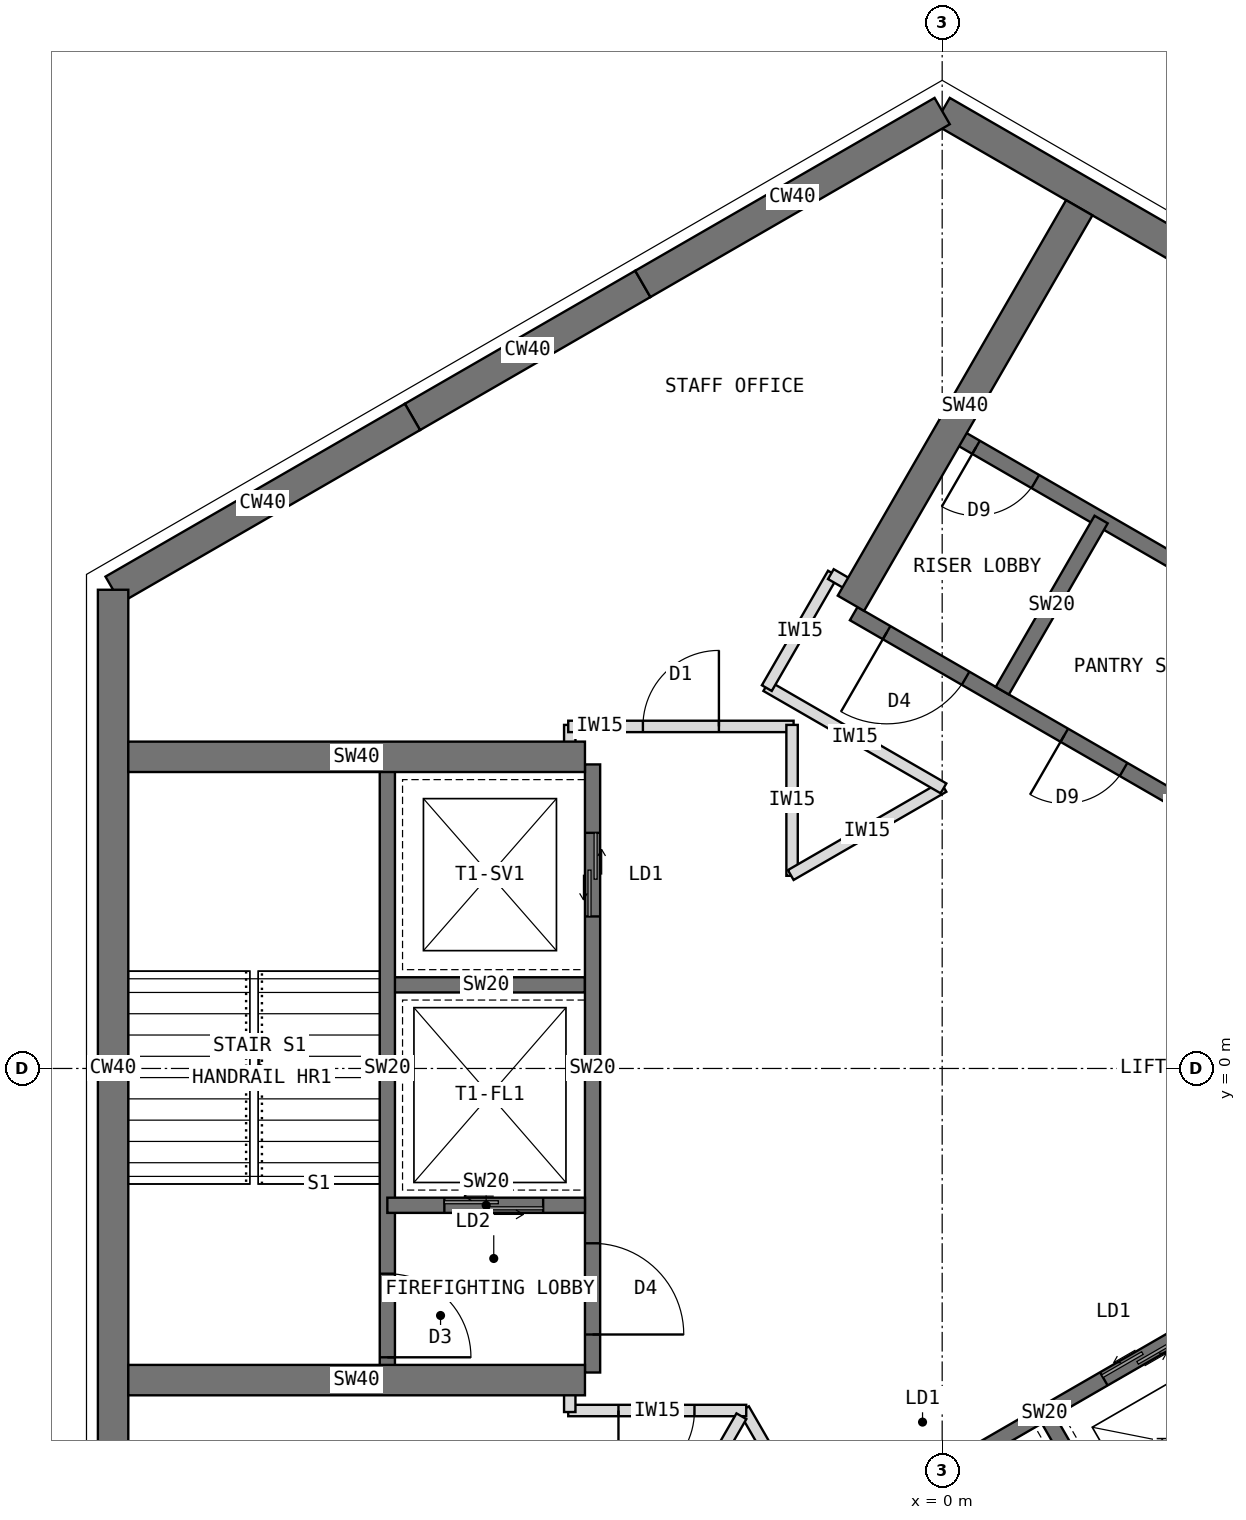
"""IFC4 building model, lengths in metres.
Left out: names, types, materials, properties, quantities, classifications, styles, units other than length and angle.
Written with IfcOpenShell. Run it as: python <this file> out.ifc"""

import sys

from ifc_helpers import new_model, si_unit, direction, frame, frame_2d, origin, place, context, subcontext, project, spatial, rectangle, extrude, element, fill, save


model = new_model("IFC4")
c1 = context("Model", 3, precision=1e-05, world=origin(), true_north=direction((0.0, 1.0)))
c2 = subcontext(c1, "Body", "Model", "MODEL_VIEW")
j1 = project(units=[si_unit("LENGTHUNIT", "METRE"), si_unit("PLANEANGLEUNIT", "RADIAN")], contexts=[c1])
p1 = place(None, origin())
s1 = spatial("IfcSite", under=j1, at=p1, CompositionType="ELEMENT")
p2 = place(p1, origin())
s2 = spatial("IfcBuilding", under=s1, at=p2, CompositionType="ELEMENT")
p3 = place(p2, frame((0.0, 0.0, 255.5)))
s3 = spatial("IfcBuildingStorey", under=s2, at=p3, CompositionType="ELEMENT", Elevation=255.5)
p4 = place(p3, frame((10.908, 6.298, 0.0), z_axis=(0.0, 0.0, 1.0), x_axis=(-0.866021940709, 0.500005998175, 0.0)))
e1 = element("IfcWall", 1, at=p4, inside=s3, PredefinedType="SHEAR", context=c2, shape_type="SweptSolid", body=[
    extrude(rectangle(XDim=12.596, YDim=0.4, at=frame_2d((6.298, 0.0))), origin(), (0.0, 0.0, 1.0), 4.0),
])
p5 = place(p3, frame((0.0, 12.596, 0.0), z_axis=(0.0, 0.0, 1.0), x_axis=(-0.866011268655, -0.500024481964, 0.0)))
e2 = element("IfcWall", 2, at=p5, inside=s3, PredefinedType="SHEAR", context=c2, shape_type="SweptSolid", body=[
    extrude(rectangle(XDim=4.548, YDim=0.4, at=frame_2d((2.274, 0.0))), origin(), (0.0, 0.0, 1.0), 4.0),
])
p6 = place(p3, frame((-3.939, 10.322, 0.0), z_axis=(0.0, 0.0, 1.0), x_axis=(-0.866019471182, -0.500010275428, 0.0)))
e3 = element("IfcWall", 3, at=p6, inside=s3, PredefinedType="SHEAR", context=c2, shape_type="SweptSolid", body=[
    extrude(rectangle(XDim=3.5, YDim=0.4, at=frame_2d((1.75, 0.0))), origin(), (0.0, 0.0, 1.0), 4.0),
])
p7 = place(p3, frame((-6.97, 8.572, 0.0), z_axis=(0.0, 0.0, 1.0), x_axis=(-0.866034513004, -0.499984222037, 0.0)))
e4 = element("IfcWall", 4, at=p7, inside=s3, PredefinedType="SHEAR", context=c2, shape_type="SweptSolid", body=[
    extrude(rectangle(XDim=4.548, YDim=0.4, at=frame_2d((2.274, 0.0))), origin(), (0.0, 0.0, 1.0), 4.0),
])
p8 = place(p3, frame((-10.908, 6.298, 0.0), z_axis=(0.0, 0.0, 1.0), x_axis=(0.0, -1.0, 0.0)))
e5 = element("IfcWall", 5, at=p8, inside=s3, PredefinedType="SHEAR", context=c2, shape_type="SweptSolid", body=[
    extrude(rectangle(XDim=12.596, YDim=0.4, at=frame_2d((6.298, 0.0))), origin(), (0.0, 0.0, 1.0), 4.0),
])
p9 = place(p3, frame((5.764, 1.984, 0.0), z_axis=(0.0, 0.0, 1.0), x_axis=(-0.866026010844, 0.49999894854, 0.0)))
e6 = element("IfcWall", 6, at=p9, inside=s3, PredefinedType="SHEAR", context=c2, shape_type="SweptSolid", body=[
    extrude(rectangle(XDim=8.0, YDim=0.2, at=frame_2d((4.0, 0.0))), origin(), (0.0, 0.0, 1.0), 4.0),
])
p10 = place(p9, frame((6.3, 0.0, 0.0)))
e7 = element("IfcOpeningElement", 7, at=p10, cuts=e6, PredefinedType="OPENING", context=c2, shape_type="SweptSolid", body=[
    extrude(rectangle(XDim=1.2, YDim=2.1, at=frame_2d((0.6, 1.05))), frame((0.0, 0.11, 0.0), z_axis=(0.0, -1.0, 0.0), x_axis=(1.0, 0.0, 0.0)), (0.0, 0.0, 1.0), 0.22),
])
p11 = place(p9, frame((1.0, 0.0, 0.0)))
e8 = element("IfcOpeningElement", 8, at=p11, cuts=e6, PredefinedType="OPENING", context=c2, shape_type="SweptSolid", body=[
    extrude(rectangle(XDim=0.9, YDim=2.1, at=frame_2d((0.45, 1.05))), frame((0.0, 0.11, 0.0), z_axis=(0.0, -1.0, 0.0), x_axis=(1.0, 0.0, 0.0)), (0.0, 0.0, 1.0), 0.22),
])
p12 = place(p9, frame((3.9, 0.0, 0.0)))
e9 = element("IfcOpeningElement", 9, at=p12, cuts=e6, PredefinedType="OPENING", context=c2, shape_type="SweptSolid", body=[
    extrude(rectangle(XDim=0.9, YDim=2.1, at=frame_2d((0.45, 1.05))), frame((0.0, 0.11, 0.0), z_axis=(0.0, -1.0, 0.0), x_axis=(1.0, 0.0, 0.0)), (0.0, 0.0, 1.0), 0.22),
])
p13 = place(p3, frame((0.791, 4.97, 0.0), z_axis=(0.0, 0.0, 1.0), x_axis=(0.499936506574, 0.866062058628, 0.0)))
e10 = element("IfcWall", 10, at=p13, inside=s3, PredefinedType="SHEAR", context=c2, shape_type="SweptSolid", body=[
    extrude(rectangle(XDim=2.6, YDim=0.2, at=frame_2d((1.3, 0.0))), origin(), (0.0, 0.0, 1.0), 4.0),
])
p14 = place(p3, frame((7.114, 4.322, 0.0), z_axis=(0.0, 0.0, 1.0), x_axis=(-0.866026010844, 0.49999894854, 0.0)))
e11 = element("IfcWall", 11, at=p14, inside=s3, PredefinedType="SHEAR", context=c2, shape_type="SweptSolid", body=[
    extrude(rectangle(XDim=8.0, YDim=0.2, at=frame_2d((4.0, 0.0))), origin(), (0.0, 0.0, 1.0), 4.0),
])
p15 = place(p14, frame((6.8, 0.0, 0.0)))
e12 = element("IfcOpeningElement", 12, at=p15, cuts=e11, PredefinedType="OPENING", context=c2, shape_type="SweptSolid", body=[
    extrude(rectangle(XDim=0.9, YDim=2.1, at=frame_2d((0.45, 1.05))), frame((0.0, 0.11, 0.0), z_axis=(0.0, -1.0, 0.0), x_axis=(1.0, 0.0, 0.0)), (0.0, 0.0, 1.0), 0.22),
])
p16 = place(p3, frame((-1.201, 6.12, 0.0), z_axis=(0.0, 0.0, 1.0), x_axis=(0.499997979876, 0.866026570101, 0.0)))
e13 = element("IfcWall", 13, at=p16, inside=s3, PredefinedType="SHEAR", context=c2, shape_type="SweptSolid", body=[
    extrude(rectangle(XDim=6.008, YDim=0.4, at=frame_2d((3.004, 0.0))), origin(), (0.0, 0.0, 1.0), 4.0),
])
p17 = place(p3, frame((-4.6, 4.0, 0.0), z_axis=(0.0, 0.0, 1.0), x_axis=(0.0, -1.0, 0.0)))
e14 = element("IfcWall", 14, at=p17, inside=s3, PredefinedType="SHEAR", context=c2, shape_type="SweptSolid", body=[
    extrude(rectangle(XDim=8.0, YDim=0.2, at=frame_2d((4.0, 0.0))), origin(), (0.0, 0.0, 1.0), 4.0),
])
p18 = place(p17, frame((6.3, 0.0, 0.0)))
e15 = element("IfcOpeningElement", 15, at=p18, cuts=e14, PredefinedType="OPENING", context=c2, shape_type="SweptSolid", body=[
    extrude(rectangle(XDim=1.2, YDim=2.1, at=frame_2d((0.6, 1.05))), frame((0.0, 0.11, 0.0), z_axis=(0.0, -1.0, 0.0), x_axis=(1.0, 0.0, 0.0)), (0.0, 0.0, 1.0), 0.22),
])
p19 = place(p17, frame((0.9, 0.0, 0.0)))
e16 = element("IfcOpeningElement", 16, at=p19, cuts=e14, PredefinedType="OPENING", context=c2, shape_type="SweptSolid", body=[
    extrude(rectangle(XDim=1.1, YDim=2.2, at=frame_2d((0.55, 1.1))), frame((0.0, 0.11, 0.0), z_axis=(0.0, -1.0, 0.0), x_axis=(1.0, 0.0, 0.0)), (0.0, 0.0, 1.0), 0.22),
])
p20 = place(p3, frame((-4.7, 1.1, 0.0), z_axis=(0.0, 0.0, 1.0), x_axis=(-1.0, 0.0, 0.0)))
e17 = element("IfcWall", 17, at=p20, inside=s3, PredefinedType="SHEAR", context=c2, shape_type="SweptSolid", body=[
    extrude(rectangle(XDim=2.6, YDim=0.2, at=frame_2d((1.3, 0.0))), origin(), (0.0, 0.0, 1.0), 4.0),
])
p21 = place(p3, frame((-4.7, -1.8, 0.0), z_axis=(0.0, 0.0, 1.0), x_axis=(-1.0, 0.0, 0.0)))
e18 = element("IfcWall", 18, at=p21, inside=s3, PredefinedType="SHEAR", context=c2, shape_type="SweptSolid", body=[
    extrude(rectangle(XDim=2.6, YDim=0.2, at=frame_2d((1.3, 0.0))), origin(), (0.0, 0.0, 1.0), 4.0),
])
p22 = place(p21, frame((0.55, 0.0, 0.0)))
e19 = element("IfcOpeningElement", 19, at=p22, cuts=e18, PredefinedType="OPENING", context=c2, shape_type="SweptSolid", body=[
    extrude(rectangle(XDim=1.3, YDim=2.2, at=frame_2d((0.65, 1.1))), frame((0.0, 0.11, 0.0), z_axis=(0.0, -1.0, 0.0), x_axis=(1.0, 0.0, 0.0)), (0.0, 0.0, 1.0), 0.22),
])
p23 = place(p3, frame((-7.3, 4.0, 0.0), z_axis=(0.0, 0.0, 1.0), x_axis=(0.0, -1.0, 0.0)))
e20 = element("IfcWall", 20, at=p23, inside=s3, PredefinedType="SHEAR", context=c2, shape_type="SweptSolid", body=[
    extrude(rectangle(XDim=8.0, YDim=0.2, at=frame_2d((4.0, 0.0))), origin(), (0.0, 0.0, 1.0), 4.0),
])
p24 = place(p23, frame((6.7, 0.0, 0.0)))
e21 = element("IfcOpeningElement", 21, at=p24, cuts=e20, PredefinedType="OPENING", context=c2, shape_type="SweptSolid", body=[
    extrude(rectangle(XDim=1.1, YDim=2.1, at=frame_2d((0.55, 1.05))), frame((0.0, 0.11, 0.0), z_axis=(0.0, -1.0, 0.0), x_axis=(1.0, 0.0, 0.0)), (0.0, 0.0, 1.0), 0.22),
])
for number, where, z_axis, x_axis in (
    (22, (-4.7, -4.1, 0.0), (0.0, 0.0, 1.0), (-1.0, 0.0, 0.0)),
    (23, (-4.7, 4.1, 0.0), (0.0, 0.0, 1.0), (-1.0, 0.0, 0.0)),
):
    element("IfcWall", number, at=place(p3, frame(where, z_axis=z_axis, x_axis=x_axis)), inside=s3, PredefinedType="SHEAR", context=c2, shape_type="SweptSolid", body=[
        extrude(rectangle(XDim=6.008, YDim=0.4, at=frame_2d((3.004, 0.0))), origin(), (0.0, 0.0, 1.0), 4.0),
    ])
p25 = place(p3, frame((-1.164, -5.984, 0.0), z_axis=(0.0, 0.0, 1.0), x_axis=(0.866026010844, 0.49999894854, 0.0)))
e24 = element("IfcWall", 24, at=p25, inside=s3, PredefinedType="SHEAR", context=c2, shape_type="SweptSolid", body=[
    extrude(rectangle(XDim=8.0, YDim=0.2, at=frame_2d((4.0, 0.0))), origin(), (0.0, 0.0, 1.0), 4.0),
])
p26 = place(p25, frame((6.3, 0.0, 0.0)))
e25 = element("IfcOpeningElement", 25, at=p26, cuts=e24, PredefinedType="OPENING", context=c2, shape_type="SweptSolid", body=[
    extrude(rectangle(XDim=1.2, YDim=2.1, at=frame_2d((0.6, 1.05))), frame((0.0, 0.11, 0.0), z_axis=(0.0, -1.0, 0.0), x_axis=(1.0, 0.0, 0.0)), (0.0, 0.0, 1.0), 0.22),
])
p27 = place(p25, frame((0.9, 0.0, 0.0)))
e26 = element("IfcOpeningElement", 26, at=p27, cuts=e24, PredefinedType="OPENING", context=c2, shape_type="SweptSolid", body=[
    extrude(rectangle(XDim=1.1, YDim=2.2, at=frame_2d((0.55, 1.1))), frame((0.0, 0.11, 0.0), z_axis=(0.0, -1.0, 0.0), x_axis=(1.0, 0.0, 0.0)), (0.0, 0.0, 1.0), 0.22),
])
p28 = place(p25, frame((3.8, 0.0, 0.0)))
e27 = element("IfcOpeningElement", 27, at=p28, cuts=e24, PredefinedType="OPENING", context=c2, shape_type="SweptSolid", body=[
    extrude(rectangle(XDim=1.1, YDim=2.2, at=frame_2d((0.55, 1.1))), frame((0.0, 0.11, 0.0), z_axis=(0.0, -1.0, 0.0), x_axis=(1.0, 0.0, 0.0)), (0.0, 0.0, 1.0), 0.22),
])
p29 = place(p3, frame((1.397, -4.62, 0.0), z_axis=(0.0, 0.0, 1.0), x_axis=(0.499936506574, -0.866062058628, 0.0)))
e28 = element("IfcWall", 28, at=p29, inside=s3, PredefinedType="SHEAR", context=c2, shape_type="SweptSolid", body=[
    extrude(rectangle(XDim=2.6, YDim=0.2, at=frame_2d((1.3, 0.0))), origin(), (0.0, 0.0, 1.0), 4.0),
])
p30 = place(p3, frame((0.186, -8.322, 0.0), z_axis=(0.0, 0.0, 1.0), x_axis=(0.866026010844, 0.49999894854, 0.0)))
e29 = element("IfcWall", 29, at=p30, inside=s3, PredefinedType="SHEAR", context=c2, shape_type="SweptSolid", body=[
    extrude(rectangle(XDim=8.0, YDim=0.2, at=frame_2d((4.0, 0.0))), origin(), (0.0, 0.0, 1.0), 4.0),
])
p31 = place(p30, frame((6.7, 0.0, 0.0)))
e30 = element("IfcOpeningElement", 30, at=p31, cuts=e29, PredefinedType="OPENING", context=c2, shape_type="SweptSolid", body=[
    extrude(rectangle(XDim=1.1, YDim=2.1, at=frame_2d((0.55, 1.05))), frame((0.0, 0.11, 0.0), z_axis=(0.0, -1.0, 0.0), x_axis=(1.0, 0.0, 0.0)), (0.0, 0.0, 1.0), 0.22),
])
p32 = place(p3, frame((-1.437, -6.511, 0.0), z_axis=(0.0, 0.0, 1.0), x_axis=(-0.500074377092, 0.865982457891, 0.0)))
e31 = element("IfcWall", 31, at=p32, inside=s3, PredefinedType="PARTITIONING", context=c2, shape_type="SweptSolid", body=[
    extrude(rectangle(XDim=2.342, YDim=0.15, at=frame_2d((1.171, 0.0))), origin(), (0.0, 0.0, 1.0), 3.8),
])
p33 = place(p32, frame((0.661, 0.0, 0.0)))
e32 = element("IfcOpeningElement", 32, at=p33, cuts=e31, PredefinedType="OPENING", context=c2, shape_type="SweptSolid", body=[
    extrude(rectangle(XDim=1.0, YDim=2.1, at=frame_2d((0.5, 1.05))), frame((0.0, 0.085, 0.0), z_axis=(0.0, -1.0, 0.0), x_axis=(1.0, 0.0, 0.0)), (0.0, 0.0, 1.0), 0.17),
])
p34 = place(p3, frame((-2.578, -4.5, 0.0), z_axis=(0.0, 0.0, 1.0), x_axis=(-1.0, 0.0, 0.0)))
e33 = element("IfcWall", 33, at=p34, inside=s3, PredefinedType="PARTITIONING", context=c2, shape_type="SweptSolid", body=[
    extrude(rectangle(XDim=2.342, YDim=0.15, at=frame_2d((1.171, 0.0))), origin(), (0.0, 0.0, 1.0), 3.8),
])
p35 = place(p34, frame((0.681, 0.0, 0.0)))
e34 = element("IfcOpeningElement", 34, at=p35, cuts=e33, PredefinedType="OPENING", context=c2, shape_type="SweptSolid", body=[
    extrude(rectangle(XDim=1.0, YDim=2.1, at=frame_2d((0.5, 1.05))), frame((0.0, 0.085, 0.0), z_axis=(0.0, -1.0, 0.0), x_axis=(1.0, 0.0, 0.0)), (0.0, 0.0, 1.0), 0.17),
])
for number, where, z_axis, x_axis in (
    (35, (-4.9, -4.52, 0.0), (0.0, 0.0, 1.0), (0.0, 1.0, 0.0)),
    (36, (-4.9, 4.09, 0.0), (0.0, 0.0, 1.0), (0.0, 1.0, 0.0)),
):
    element("IfcWall", number, at=place(p3, frame(where, z_axis=z_axis, x_axis=x_axis)), inside=s3, PredefinedType="PARTITIONING", context=c2, shape_type="SweptSolid", body=[
        extrude(rectangle(XDim=0.43, YDim=0.15, at=frame_2d((0.215, 0.0))), origin(), (0.0, 0.0, 1.0), 3.8),
    ])
p36 = place(p3, frame((-4.92, 4.5, 0.0), z_axis=(0.0, 0.0, 1.0), x_axis=(1.0, 0.0, 0.0)))
e37 = element("IfcWall", 37, at=p36, inside=s3, PredefinedType="PARTITIONING", context=c2, shape_type="SweptSolid", body=[
    extrude(rectangle(XDim=2.965, YDim=0.15, at=frame_2d((1.482, 0.0))), origin(), (0.0, 0.0, 1.0), 3.8),
])
p37 = place(p36, frame((0.982, 0.0, 0.0)))
e38 = element("IfcOpeningElement", 38, at=p37, cuts=e37, PredefinedType="OPENING", context=c2, shape_type="SweptSolid", body=[
    extrude(rectangle(XDim=1.0, YDim=2.1, at=frame_2d((0.5, 1.05))), frame((0.0, 0.085, 0.0), z_axis=(0.0, -1.0, 0.0), x_axis=(1.0, 0.0, 0.0)), (0.0, 0.0, 1.0), 0.17),
])
p38 = place(p3, frame((-1.975, 4.52, 0.0), z_axis=(0.0, 0.0, 1.0), x_axis=(0.0, -1.0, 0.0)))
e39 = element("IfcWall", 39, at=p38, inside=s3, PredefinedType="PARTITIONING", context=c2, shape_type="SweptSolid", body=[
    extrude(rectangle(XDim=1.985, YDim=0.15, at=frame_2d((0.993, 0.0))), origin(), (0.0, 0.0, 1.0), 3.8),
])
p39 = place(p3, frame((-1.992, 2.545, 0.0), z_axis=(0.0, 0.0, 1.0), x_axis=(0.866059450854, 0.499941024108, 0.0)))
e40 = element("IfcWall", 40, at=p39, inside=s3, PredefinedType="PARTITIONING", context=c2, shape_type="SweptSolid", body=[
    extrude(rectangle(XDim=2.321, YDim=0.15, at=frame_2d((1.16, 0.0))), origin(), (0.0, 0.0, 1.0), 3.8),
])
p40 = place(p3, frame((0.017, 3.685, 0.0), z_axis=(0.0, 0.0, 1.0), x_axis=(-0.866036099759, 0.499981473571, 0.0)))
e41 = element("IfcWall", 41, at=p40, inside=s3, PredefinedType="PARTITIONING", context=c2, shape_type="SweptSolid", body=[
    extrude(rectangle(XDim=2.692, YDim=0.15, at=frame_2d((1.346, 0.0))), origin(), (0.0, 0.0, 1.0), 3.8),
])
p41 = place(p3, frame((-2.307, 5.004, 0.0), z_axis=(0.0, 0.0, 1.0), x_axis=(0.500062521093, 0.865989304205, 0.0)))
e42 = element("IfcWall", 42, at=p41, inside=s3, PredefinedType="PARTITIONING", context=c2, shape_type="SweptSolid", body=[
    extrude(rectangle(XDim=1.74, YDim=0.15, at=frame_2d((0.87, 0.0))), origin(), (0.0, 0.0, 1.0), 3.8),
])
p42 = place(p3, frame((-1.464, 6.503, 0.0), z_axis=(0.0, 0.0, 1.0), x_axis=(0.866138304741, -0.499804398801, 0.0)))
e43 = element("IfcWall", 43, at=p42, inside=s3, PredefinedType="PARTITIONING", context=c2, shape_type="SweptSolid", body=[
    extrude(rectangle(XDim=0.43, YDim=0.15, at=frame_2d((0.215, 0.0))), origin(), (0.0, 0.0, 1.0), 3.8),
])
p43 = place(p3, frame((-2.641, -4.575, 0.0), z_axis=(0.0, 0.0, 1.0), x_axis=(-0.500010688608, -0.866019232626, 0.0)))
e44 = element("IfcWall", 44, at=p43, inside=s3, PredefinedType="PARTITIONING", context=c2, shape_type="SweptSolid", body=[
    extrude(rectangle(XDim=5.426, YDim=0.15, at=frame_2d((2.713, 0.0))), origin(), (0.0, 0.0, 1.0), 3.8),
])
p44 = place(p10, origin())
e45 = element("IfcDoor", 45, at=p44, inside=s3, OperationType="SINGLE_SWING_RIGHT", PredefinedType="DOOR", context=c2, shape_type="SweptSolid", body=[
    extrude(rectangle(XDim=1.2, YDim=2.1, at=frame_2d((0.6, 1.05))), frame((0.0, 0.025, 0.0), z_axis=(0.0, -1.0, 0.0), x_axis=(1.0, 0.0, 0.0)), (0.0, 0.0, 1.0), 0.05),
])
fill(e7, e45)
p45 = place(p15, origin())
e46 = element("IfcDoor", 46, at=p45, inside=s3, OperationType="SINGLE_SWING_RIGHT", PredefinedType="DOOR", context=c2, shape_type="SweptSolid", body=[
    extrude(rectangle(XDim=0.9, YDim=2.1, at=frame_2d((0.45, 1.05))), frame((0.0, 0.025, 0.0), z_axis=(0.0, -1.0, 0.0), x_axis=(1.0, 0.0, 0.0)), (0.0, 0.0, 1.0), 0.05),
])
fill(e12, e46)
p46 = place(p18, origin())
e47 = element("IfcDoor", 47, at=p46, inside=s3, OperationType="SINGLE_SWING_RIGHT", PredefinedType="DOOR", context=c2, shape_type="SweptSolid", body=[
    extrude(rectangle(XDim=1.2, YDim=2.1, at=frame_2d((0.6, 1.05))), frame((0.0, 0.025, 0.0), z_axis=(0.0, -1.0, 0.0), x_axis=(1.0, 0.0, 0.0)), (0.0, 0.0, 1.0), 0.05),
])
fill(e15, e47)
p47 = place(p22, origin())
e48 = element("IfcDoor", 48, at=p47, inside=s3, OperationType="DOUBLE_DOOR_SLIDING", PredefinedType="DOOR", context=c2, shape_type="SweptSolid", body=[
    extrude(rectangle(XDim=1.3, YDim=2.2, at=frame_2d((0.65, 1.1))), frame((0.0, 0.025, 0.0), z_axis=(0.0, -1.0, 0.0), x_axis=(1.0, 0.0, 0.0)), (0.0, 0.0, 1.0), 0.05),
])
fill(e19, e48)
p48 = place(p19, origin())
e49 = element("IfcDoor", 49, at=p48, inside=s3, OperationType="DOUBLE_DOOR_SLIDING", PredefinedType="DOOR", context=c2, shape_type="SweptSolid", body=[
    extrude(rectangle(XDim=1.1, YDim=2.2, at=frame_2d((0.55, 1.1))), frame((0.0, 0.025, 0.0), z_axis=(0.0, -1.0, 0.0), x_axis=(1.0, 0.0, 0.0)), (0.0, 0.0, 1.0), 0.05),
])
fill(e16, e49)
p49 = place(p24, origin())
e50 = element("IfcDoor", 50, at=p49, inside=s3, OperationType="SINGLE_SWING_RIGHT", PredefinedType="DOOR", context=c2, shape_type="SweptSolid", body=[
    extrude(rectangle(XDim=1.1, YDim=2.1, at=frame_2d((0.55, 1.05))), frame((0.0, 0.025, 0.0), z_axis=(0.0, -1.0, 0.0), x_axis=(1.0, 0.0, 0.0)), (0.0, 0.0, 1.0), 0.05),
])
fill(e21, e50)
p50 = place(p28, origin())
e51 = element("IfcDoor", 51, at=p50, inside=s3, OperationType="DOUBLE_DOOR_SLIDING", PredefinedType="DOOR", context=c2, shape_type="SweptSolid", body=[
    extrude(rectangle(XDim=1.1, YDim=2.2, at=frame_2d((0.55, 1.1))), frame((0.0, 0.025, 0.0), z_axis=(0.0, -1.0, 0.0), x_axis=(1.0, 0.0, 0.0)), (0.0, 0.0, 1.0), 0.05),
])
fill(e27, e51)
p51 = place(p35, origin())
e52 = element("IfcDoor", 52, at=p51, inside=s3, OperationType="SINGLE_SWING_RIGHT", PredefinedType="DOOR", context=c2, shape_type="SweptSolid", body=[
    extrude(rectangle(XDim=1.0, YDim=2.1, at=frame_2d((0.5, 1.05))), frame((0.0, 0.025, 0.0), z_axis=(0.0, -1.0, 0.0), x_axis=(1.0, 0.0, 0.0)), (0.0, 0.0, 1.0), 0.05),
])
fill(e34, e52)
p52 = place(p37, origin())
e53 = element("IfcDoor", 53, at=p52, inside=s3, OperationType="SINGLE_SWING_RIGHT", PredefinedType="DOOR", context=c2, shape_type="SweptSolid", body=[
    extrude(rectangle(XDim=1.0, YDim=2.1, at=frame_2d((0.5, 1.05))), frame((0.0, 0.025, 0.0), z_axis=(0.0, -1.0, 0.0), x_axis=(1.0, 0.0, 0.0)), (0.0, 0.0, 1.0), 0.05),
])
fill(e38, e53)
p53 = place(p12, origin())
e54 = element("IfcDoor", 54, at=p53, inside=s3, OperationType="SINGLE_SWING_RIGHT", PredefinedType="DOOR", context=c2, shape_type="SweptSolid", body=[
    extrude(rectangle(XDim=0.9, YDim=2.1, at=frame_2d((0.45, 1.05))), frame((0.0, 0.025, 0.0), z_axis=(0.0, -1.0, 0.0), x_axis=(1.0, 0.0, 0.0)), (0.0, 0.0, 1.0), 0.05),
])
fill(e9, e54)
save(model, sys.argv[1])
